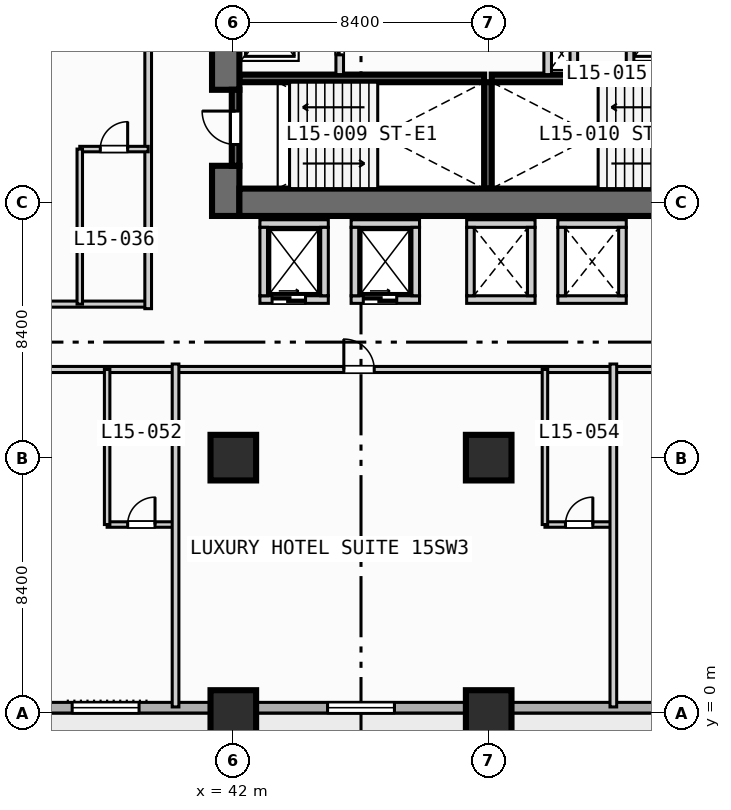
"""IFC4 building model, lengths in metres.
Left out: names, types, materials, properties, quantities, classifications, styles, units other than length and angle.
Written with IfcOpenShell. Run it as: python <this file> out.ifc"""

import sys

from ifc_helpers import new_model, si_unit, direction, frame, frame_2d, origin, origin_2d, place, context, subcontext, project, spatial, rectangle, extrude, element, fill, save


model = new_model("IFC4")
c1 = context("Model", 3, precision=1e-05, world=origin(), true_north=direction((0.0, 1.0)))
c2 = subcontext(c1, "Body", "Model", "MODEL_VIEW")
j1 = project(units=[si_unit("LENGTHUNIT", "METRE"), si_unit("PLANEANGLEUNIT", "RADIAN")], contexts=[c1])
p1 = place(None, origin())
s1 = spatial("IfcSite", under=j1, at=p1, CompositionType="ELEMENT")
p2 = place(p1, origin())
s2 = spatial("IfcBuilding", under=s1, at=p2, CompositionType="ELEMENT")
p3 = place(p2, frame((0.0, 0.0, 66.2)))
s3 = spatial("IfcBuildingStorey", under=s2, at=p3, CompositionType="ELEMENT", Elevation=66.2)
for number, where, z_axis, x_axis in (
    (1, (42.2, 20.875, 0.0), (0.0, 0.0, 1.0), (1.0, 0.0, 0.0)),
    (2, (50.5, 20.875, 0.0), (0.0, 0.0, 1.0), (1.0, 0.0, 0.0)),
):
    element("IfcWall", number, at=place(p3, frame(where, z_axis=z_axis, x_axis=x_axis)), inside=s3, PredefinedType="SOLIDWALL", context=c2, shape_type="SweptSolid", body=[
        extrude(rectangle(XDim=8.05, YDim=0.25, at=frame_2d((4.025, 0.0))), origin(), (0.0, 0.0, 1.0), 3.55),
    ])
p4 = place(p3, frame((50.375, 17.25, 0.0), z_axis=(0.0, 0.0, 1.0), x_axis=(0.0, 1.0, 0.0)))
e3 = element("IfcWall", 3, at=p4, inside=s3, PredefinedType="SOLIDWALL", context=c2, shape_type="SweptSolid", body=[
    extrude(rectangle(XDim=3.5, YDim=0.25, at=frame_2d((1.75, 0.0))), origin(), (0.0, 0.0, 1.0), 3.55),
])
p5 = place(p3, frame((41.75, 16.35, 0.0), z_axis=(0.0, 0.0, 1.0), x_axis=(0.0, 1.0, 0.0)))
e4 = element("IfcWall", 4, at=p5, inside=s3, PredefinedType="SHEAR", context=c2, shape_type="SweptSolid", body=[
    extrude(rectangle(XDim=1.65, YDim=0.9, at=frame_2d((0.825, 0.0))), origin(), (0.0, 0.0, 1.0), 3.55),
])
p6 = place(p3, frame((41.75, 20.5, 0.0), z_axis=(0.0, 0.0, 1.0), x_axis=(0.0, 1.0, 0.0)))
e5 = element("IfcWall", 5, at=p6, inside=s3, PredefinedType="SHEAR", context=c2, shape_type="SweptSolid", body=[
    extrude(rectangle(XDim=5.15, YDim=0.9, at=frame_2d((2.575, 0.0))), origin(), (0.0, 0.0, 1.0), 3.55),
])
p7 = place(p3, frame((42.2, 16.8, 0.0), z_axis=(0.0, 0.0, 1.0), x_axis=(1.0, 0.0, 0.0)))
e6 = element("IfcWall", 6, at=p7, inside=s3, PredefinedType="SHEAR", context=c2, shape_type="SweptSolid", body=[
    extrude(rectangle(XDim=16.35, YDim=0.9, at=frame_2d((8.175, 0.0))), origin(), (0.0, 0.0, 1.0), 3.55),
])
for number, where, z_axis, x_axis in (
    (7, (42.0, 0.0, 0.0), (0.0, 0.0, 1.0), (1.0, 0.0, 0.0)),
    (8, (42.0, 8.4, 0.0), (0.0, 0.0, 1.0), (1.0, 0.0, 0.0)),
    (9, (50.4, 0.0, 0.0), (0.0, 0.0, 1.0), (1.0, 0.0, 0.0)),
    (10, (50.4, 8.4, 0.0), (0.0, 0.0, 1.0), (1.0, 0.0, 0.0)),
):
    element("IfcColumn", number, at=place(p3, frame(where, z_axis=z_axis, x_axis=x_axis)), inside=s3, PredefinedType="COLUMN", context=c2, shape_type="SweptSolid", body=[
        extrude(rectangle(XDim=1.5, YDim=1.5, at=origin_2d()), origin(), (0.0, 0.0, 1.0), 3.8),
    ])
p8 = place(p3, frame((89.225, 0.175, 0.0), z_axis=(0.0, 0.0, 1.0), x_axis=(-1.0, 0.0, 0.0)))
e11 = element("IfcWall", 11, at=p8, inside=s3, PredefinedType="STANDARD", context=c2, shape_type="SweptSolid", body=[
    extrude(rectangle(XDim=86.05, YDim=0.35, at=frame_2d((43.025, 0.0))), origin(), (0.0, 0.0, 1.0), 3.55),
])
p9 = place(p8, frame((67.525, 0.0, 0.0)))
e12 = element("IfcOpeningElement", 12, at=p9, cuts=e11, PredefinedType="OPENING", context=c2, shape_type="SweptSolid", body=[
    extrude(rectangle(XDim=1.4, YDim=2.2, at=frame_2d((0.7, 1.1))), frame((0.0, 0.185, 0.0), z_axis=(0.0, -1.0, 0.0), x_axis=(1.0, 0.0, 0.0)), (0.0, 0.0, 1.0), 0.37),
])
p10 = place(p8, frame((58.725, 0.0, 0.85)))
e13 = element("IfcOpeningElement", 13, at=p10, cuts=e11, PredefinedType="OPENING", context=c2, shape_type="SweptSolid", body=[
    extrude(rectangle(XDim=2.2, YDim=1.8, at=frame_2d((1.1, 0.9))), frame((0.0, 0.185, 0.0), z_axis=(0.0, -1.0, 0.0), x_axis=(1.0, 0.0, 0.0)), (0.0, 0.0, 1.0), 0.37),
])
p11 = place(p8, frame((50.325, 0.0, 0.85)))
e14 = element("IfcOpeningElement", 14, at=p11, cuts=e11, PredefinedType="OPENING", context=c2, shape_type="SweptSolid", body=[
    extrude(rectangle(XDim=2.2, YDim=1.8, at=frame_2d((1.1, 0.9))), frame((0.0, 0.185, 0.0), z_axis=(0.0, -1.0, 0.0), x_axis=(1.0, 0.0, 0.0)), (0.0, 0.0, 1.0), 0.37),
])
p12 = place(p8, frame((41.925, 0.0, 0.85)))
e15 = element("IfcOpeningElement", 15, at=p12, cuts=e11, PredefinedType="OPENING", context=c2, shape_type="SweptSolid", body=[
    extrude(rectangle(XDim=2.2, YDim=1.8, at=frame_2d((1.1, 0.9))), frame((0.0, 0.185, 0.0), z_axis=(0.0, -1.0, 0.0), x_axis=(1.0, 0.0, 0.0)), (0.0, 0.0, 1.0), 0.37),
])
p13 = place(p8, frame((27.675, 0.0, 0.85)))
e16 = element("IfcOpeningElement", 16, at=p13, cuts=e11, PredefinedType="OPENING", context=c2, shape_type="SweptSolid", body=[
    extrude(rectangle(XDim=1.8, YDim=1.8, at=frame_2d((0.9, 0.9))), frame((0.0, 0.185, 0.0), z_axis=(0.0, -1.0, 0.0), x_axis=(1.0, 0.0, 0.0)), (0.0, 0.0, 1.0), 0.37),
])
p14 = place(p3, frame((42.075, 18.0, 0.0), z_axis=(0.0, 0.0, 1.0), x_axis=(0.0, 1.0, 0.0)))
e17 = element("IfcWall", 17, at=p14, inside=s3, PredefinedType="SOLIDWALL", context=c2, shape_type="SweptSolid", body=[
    extrude(rectangle(XDim=2.5, YDim=0.25, at=frame_2d((1.25, 0.0))), origin(), (0.0, 0.0, 1.0), 3.55),
])
p15 = place(p14, frame((0.7, 0.0, 0.0)))
e18 = element("IfcOpeningElement", 18, at=p15, cuts=e17, PredefinedType="OPENING", context=c2, shape_type="SweptSolid", body=[
    extrude(rectangle(XDim=1.1, YDim=2.15, at=frame_2d((0.55, 1.075))), frame((0.0, 0.135, 0.0), z_axis=(0.0, -1.0, 0.0), x_axis=(1.0, 0.0, 0.0)), (0.0, 0.0, 1.0), 0.27),
])
p16 = place(p3, frame((45.5, 21.0, 0.0), z_axis=(0.0, 0.0, 1.0), x_axis=(0.0, 1.0, 0.0)))
e19 = element("IfcWall", 19, at=p16, inside=s3, PredefinedType="SOLIDWALL", context=c2, shape_type="SweptSolid", body=[
    extrude(rectangle(XDim=4.15, YDim=0.25, at=frame_2d((2.075, 0.0))), origin(), (0.0, 0.0, 1.0), 3.55),
])
p17 = place(p16, frame((0.65, 0.0, 0.0)))
e20 = element("IfcOpeningElement", 20, at=p17, cuts=e19, PredefinedType="OPENING", context=c2, shape_type="SweptSolid", body=[
    extrude(rectangle(XDim=1.1, YDim=2.15, at=frame_2d((0.55, 1.075))), frame((0.0, 0.135, 0.0), z_axis=(0.0, -1.0, 0.0), x_axis=(1.0, 0.0, 0.0)), (0.0, 0.0, 1.0), 0.27),
])
p18 = place(p3, frame((52.34, 21.0, 0.0), z_axis=(0.0, 0.0, 1.0), x_axis=(0.0, 1.0, 0.0)))
e21 = element("IfcWall", 21, at=p18, inside=s3, PredefinedType="SOLIDWALL", context=c2, shape_type="SweptSolid", body=[
    extrude(rectangle(XDim=3.75, YDim=0.25, at=frame_2d((1.875, 0.0))), origin(), (0.0, 0.0, 1.0), 3.55),
])
p19 = place(p3, frame((55.05, 21.0, 0.0), z_axis=(0.0, 0.0, 1.0), x_axis=(0.0, 1.0, 0.0)))
e22 = element("IfcWall", 22, at=p19, inside=s3, PredefinedType="SOLIDWALL", context=c2, shape_type="SweptSolid", body=[
    extrude(rectangle(XDim=4.15, YDim=0.25, at=frame_2d((2.075, 0.0))), origin(), (0.0, 0.0, 1.0), 3.55),
])
p20 = place(p19, frame((1.85, 0.0, 0.0)))
e23 = element("IfcOpeningElement", 23, at=p20, cuts=e22, PredefinedType="OPENING", context=c2, shape_type="SweptSolid", body=[
    extrude(rectangle(XDim=1.1, YDim=2.15, at=frame_2d((0.55, 1.075))), frame((0.0, 0.135, 0.0), z_axis=(0.0, -1.0, 0.0), x_axis=(1.0, 0.0, 0.0)), (0.0, 0.0, 1.0), 0.27),
])
p21 = place(p3, frame((53.2, 21.0, 0.0), z_axis=(0.0, 0.0, 1.0), x_axis=(0.0, 1.0, 0.0)))
e24 = element("IfcWall", 24, at=p21, inside=s3, PredefinedType="SOLIDWALL", context=c2, shape_type="SweptSolid", body=[
    extrude(rectangle(XDim=1.3, YDim=0.25, at=frame_2d((0.65, 0.0))), origin(), (0.0, 0.0, 1.0), 3.55),
])
p22 = place(p3, frame((42.875, 13.6, 0.0), z_axis=(0.0, 0.0, 1.0), x_axis=(1.0, 0.0, 0.0)))
e25 = element("IfcWall", 25, at=p22, inside=s3, PredefinedType="SOLIDWALL", context=c2, shape_type="SweptSolid", body=[
    extrude(rectangle(XDim=2.25, YDim=0.25, at=frame_2d((1.125, 0.0))), origin(), (0.0, 0.0, 1.0), 3.55),
])
p23 = place(p22, frame((0.4, 0.0, 0.0)))
e26 = element("IfcOpeningElement", 26, at=p23, cuts=e25, PredefinedType="OPENING", context=c2, shape_type="SweptSolid", body=[
    extrude(rectangle(XDim=1.1, YDim=2.15, at=frame_2d((0.55, 1.075))), frame((0.0, 0.135, 0.0), z_axis=(0.0, -1.0, 0.0), x_axis=(1.0, 0.0, 0.0)), (0.0, 0.0, 1.0), 0.27),
])
for number, where, z_axis, x_axis in (
    (27, (42.875, 16.1, 0.0), (0.0, 0.0, 1.0), (1.0, 0.0, 0.0)),
    (28, (43.0, 13.725, 0.0), (0.0, 0.0, 1.0), (0.0, 1.0, 0.0)),
    (29, (45.0, 13.725, 0.0), (0.0, 0.0, 1.0), (0.0, 1.0, 0.0)),
):
    element("IfcWall", number, at=place(p3, frame(where, z_axis=z_axis, x_axis=x_axis)), inside=s3, PredefinedType="SOLIDWALL", context=c2, shape_type="SweptSolid", body=[
        extrude(rectangle(XDim=2.25, YDim=0.25, at=frame_2d((1.125, 0.0))), origin(), (0.0, 0.0, 1.0), 3.55),
    ])
p24 = place(p3, frame((45.875, 13.6, 0.0), z_axis=(0.0, 0.0, 1.0), x_axis=(1.0, 0.0, 0.0)))
e30 = element("IfcWall", 30, at=p24, inside=s3, PredefinedType="SOLIDWALL", context=c2, shape_type="SweptSolid", body=[
    extrude(rectangle(XDim=2.25, YDim=0.25, at=frame_2d((1.125, 0.0))), origin(), (0.0, 0.0, 1.0), 3.55),
])
p25 = place(p24, frame((0.4, 0.0, 0.0)))
e31 = element("IfcOpeningElement", 31, at=p25, cuts=e30, PredefinedType="OPENING", context=c2, shape_type="SweptSolid", body=[
    extrude(rectangle(XDim=1.1, YDim=2.15, at=frame_2d((0.55, 1.075))), frame((0.0, 0.135, 0.0), z_axis=(0.0, -1.0, 0.0), x_axis=(1.0, 0.0, 0.0)), (0.0, 0.0, 1.0), 0.27),
])
for number, where, z_axis, x_axis in (
    (32, (45.875, 16.1, 0.0), (0.0, 0.0, 1.0), (1.0, 0.0, 0.0)),
    (33, (46.0, 13.725, 0.0), (0.0, 0.0, 1.0), (0.0, 1.0, 0.0)),
    (34, (48.0, 13.725, 0.0), (0.0, 0.0, 1.0), (0.0, 1.0, 0.0)),
    (35, (49.675, 13.6, 0.0), (0.0, 0.0, 1.0), (1.0, 0.0, 0.0)),
    (36, (49.675, 16.1, 0.0), (0.0, 0.0, 1.0), (1.0, 0.0, 0.0)),
    (37, (49.8, 13.725, 0.0), (0.0, 0.0, 1.0), (0.0, 1.0, 0.0)),
    (38, (51.8, 13.725, 0.0), (0.0, 0.0, 1.0), (0.0, 1.0, 0.0)),
    (39, (52.675, 13.6, 0.0), (0.0, 0.0, 1.0), (1.0, 0.0, 0.0)),
    (40, (52.675, 16.1, 0.0), (0.0, 0.0, 1.0), (1.0, 0.0, 0.0)),
    (41, (52.8, 13.725, 0.0), (0.0, 0.0, 1.0), (0.0, 1.0, 0.0)),
    (42, (54.8, 13.725, 0.0), (0.0, 0.0, 1.0), (0.0, 1.0, 0.0)),
):
    element("IfcWall", number, at=place(p3, frame(where, z_axis=z_axis, x_axis=x_axis)), inside=s3, PredefinedType="SOLIDWALL", context=c2, shape_type="SweptSolid", body=[
        extrude(rectangle(XDim=2.25, YDim=0.25, at=frame_2d((1.125, 0.0))), origin(), (0.0, 0.0, 1.0), 3.55),
    ])
p26 = place(p3, frame((25.6, 13.45, 0.0), z_axis=(0.0, 0.0, 1.0), x_axis=(1.0, 0.0, 0.0)))
e43 = element("IfcWall", 43, at=p26, inside=s3, PredefinedType="PARTITIONING", context=c2, shape_type="SweptSolid", body=[
    extrude(rectangle(XDim=13.6, YDim=0.2, at=frame_2d((6.8, 0.0))), origin(), (0.0, 0.0, 1.0), 3.55),
])
p27 = place(p26, frame((1.735, 0.0, 0.0)))
e44 = element("IfcOpeningElement", 44, at=p27, cuts=e43, PredefinedType="OPENING", context=c2, shape_type="SweptSolid", body=[
    extrude(rectangle(XDim=1.0, YDim=2.15, at=frame_2d((0.5, 1.075))), frame((0.0, 0.11, 0.0), z_axis=(0.0, -1.0, 0.0), x_axis=(1.0, 0.0, 0.0)), (0.0, 0.0, 1.0), 0.22),
])
p28 = place(p26, frame((8.535, 0.0, 0.0)))
e45 = element("IfcOpeningElement", 45, at=p28, cuts=e43, PredefinedType="OPENING", context=c2, shape_type="SweptSolid", body=[
    extrude(rectangle(XDim=1.0, YDim=2.15, at=frame_2d((0.5, 1.075))), frame((0.0, 0.11, 0.0), z_axis=(0.0, -1.0, 0.0), x_axis=(1.0, 0.0, 0.0)), (0.0, 0.0, 1.0), 0.22),
])
p29 = place(p3, frame((39.2, 13.3, 0.0), z_axis=(0.0, 0.0, 1.0), x_axis=(0.0, 1.0, 0.0)))
e46 = element("IfcWall", 46, at=p29, inside=s3, PredefinedType="PARTITIONING", context=c2, shape_type="SweptSolid", body=[
    extrude(rectangle(XDim=20.13, YDim=0.22, at=frame_2d((10.065, 0.0))), origin(), (0.0, 0.0, 1.0), 3.55),
])
p30 = place(p3, frame((36.95, 18.55, 0.0), z_axis=(0.0, 0.0, 1.0), x_axis=(1.0, 0.0, 0.0)))
e47 = element("IfcWall", 47, at=p30, inside=s3, PredefinedType="PLUMBINGWALL", context=c2, shape_type="SweptSolid", body=[
    extrude(rectangle(XDim=2.25, YDim=0.18, at=frame_2d((1.125, 0.0))), origin(), (0.0, 0.0, 1.0), 3.55),
])
p31 = place(p30, frame((0.675, 0.0, 0.0)))
e48 = element("IfcOpeningElement", 48, at=p31, cuts=e47, PredefinedType="OPENING", context=c2, shape_type="SweptSolid", body=[
    extrude(rectangle(XDim=0.9, YDim=2.1, at=frame_2d((0.45, 1.05))), frame((0.0, 0.1, 0.0), z_axis=(0.0, -1.0, 0.0), x_axis=(1.0, 0.0, 0.0)), (0.0, 0.0, 1.0), 0.2),
])
p32 = place(p3, frame((36.95, 13.45, 0.0), z_axis=(0.0, 0.0, 1.0), x_axis=(0.0, 1.0, 0.0)))
e49 = element("IfcWall", 49, at=p32, inside=s3, PredefinedType="PLUMBINGWALL", context=c2, shape_type="SweptSolid", body=[
    extrude(rectangle(XDim=5.1, YDim=0.18, at=frame_2d((2.55, 0.0))), origin(), (0.0, 0.0, 1.0), 3.55),
])
p33 = place(p3, frame((13.7, 11.3, 0.0), z_axis=(0.0, 0.0, 1.0), x_axis=(1.0, 0.0, 0.0)))
e50 = element("IfcWall", 50, at=p33, inside=s3, PredefinedType="PARTITIONING", context=c2, shape_type="SweptSolid", body=[
    extrude(rectangle(XDim=50.1, YDim=0.2, at=frame_2d((25.05, 0.0))), origin(), (0.0, 0.0, 1.0), 3.55),
])
p34 = place(p33, frame((3.61, 0.0, 0.0)))
e51 = element("IfcOpeningElement", 51, at=p34, cuts=e50, PredefinedType="OPENING", context=c2, shape_type="SweptSolid", body=[
    extrude(rectangle(XDim=1.0, YDim=2.15, at=frame_2d((0.5, 1.075))), frame((0.0, 0.11, 0.0), z_axis=(0.0, -1.0, 0.0), x_axis=(1.0, 0.0, 0.0)), (0.0, 0.0, 1.0), 0.22),
])
p35 = place(p33, frame((16.81, 0.0, 0.0)))
e52 = element("IfcOpeningElement", 52, at=p35, cuts=e50, PredefinedType="OPENING", context=c2, shape_type="SweptSolid", body=[
    extrude(rectangle(XDim=1.0, YDim=2.15, at=frame_2d((0.5, 1.075))), frame((0.0, 0.11, 0.0), z_axis=(0.0, -1.0, 0.0), x_axis=(1.0, 0.0, 0.0)), (0.0, 0.0, 1.0), 0.22),
])
p36 = place(p33, frame((31.935, 0.0, 0.0)))
e53 = element("IfcOpeningElement", 53, at=p36, cuts=e50, PredefinedType="OPENING", context=c2, shape_type="SweptSolid", body=[
    extrude(rectangle(XDim=1.0, YDim=2.15, at=frame_2d((0.5, 1.075))), frame((0.0, 0.11, 0.0), z_axis=(0.0, -1.0, 0.0), x_axis=(1.0, 0.0, 0.0)), (0.0, 0.0, 1.0), 0.22),
])
p37 = place(p33, frame((43.785, 0.0, 0.0)))
e54 = element("IfcOpeningElement", 54, at=p37, cuts=e50, PredefinedType="OPENING", context=c2, shape_type="SweptSolid", body=[
    extrude(rectangle(XDim=1.0, YDim=2.15, at=frame_2d((0.5, 1.075))), frame((0.0, 0.11, 0.0), z_axis=(0.0, -1.0, 0.0), x_axis=(1.0, 0.0, 0.0)), (0.0, 0.0, 1.0), 0.22),
])
p38 = place(p3, frame((37.85, 6.2, 0.0), z_axis=(0.0, 0.0, 1.0), x_axis=(1.0, 0.0, 0.0)))
e55 = element("IfcWall", 55, at=p38, inside=s3, PredefinedType="PLUMBINGWALL", context=c2, shape_type="SweptSolid", body=[
    extrude(rectangle(XDim=2.25, YDim=0.18, at=frame_2d((1.125, 0.0))), origin(), (0.0, 0.0, 1.0), 3.55),
])
p39 = place(p38, frame((0.675, 0.0, 0.0)))
e56 = element("IfcOpeningElement", 56, at=p39, cuts=e55, PredefinedType="OPENING", context=c2, shape_type="SweptSolid", body=[
    extrude(rectangle(XDim=0.9, YDim=2.1, at=frame_2d((0.45, 1.05))), frame((0.0, 0.1, 0.0), z_axis=(0.0, -1.0, 0.0), x_axis=(1.0, 0.0, 0.0)), (0.0, 0.0, 1.0), 0.2),
])
p40 = place(p3, frame((37.85, 6.2, 0.0), z_axis=(0.0, 0.0, 1.0), x_axis=(0.0, 1.0, 0.0)))
e57 = element("IfcWall", 57, at=p40, inside=s3, PredefinedType="PLUMBINGWALL", context=c2, shape_type="SweptSolid", body=[
    extrude(rectangle(XDim=5.1, YDim=0.18, at=frame_2d((2.55, 0.0))), origin(), (0.0, 0.0, 1.0), 3.55),
])
p41 = place(p3, frame((40.1, 0.2, 0.0), z_axis=(0.0, 0.0, 1.0), x_axis=(0.0, 1.0, 0.0)))
e58 = element("IfcWall", 58, at=p41, inside=s3, PredefinedType="PARTITIONING", context=c2, shape_type="SweptSolid", body=[
    extrude(rectangle(XDim=11.28, YDim=0.22, at=frame_2d((5.64, 0.0))), origin(), (0.0, 0.0, 1.0), 3.55),
])
p42 = place(p3, frame((52.25, 6.2, 0.0), z_axis=(0.0, 0.0, 1.0), x_axis=(1.0, 0.0, 0.0)))
e59 = element("IfcWall", 59, at=p42, inside=s3, PredefinedType="PLUMBINGWALL", context=c2, shape_type="SweptSolid", body=[
    extrude(rectangle(XDim=2.25, YDim=0.18, at=frame_2d((1.125, 0.0))), origin(), (0.0, 0.0, 1.0), 3.55),
])
p43 = place(p42, frame((0.675, 0.0, 0.0)))
e60 = element("IfcOpeningElement", 60, at=p43, cuts=e59, PredefinedType="OPENING", context=c2, shape_type="SweptSolid", body=[
    extrude(rectangle(XDim=0.9, YDim=2.1, at=frame_2d((0.45, 1.05))), frame((0.0, 0.1, 0.0), z_axis=(0.0, -1.0, 0.0), x_axis=(1.0, 0.0, 0.0)), (0.0, 0.0, 1.0), 0.2),
])
p44 = place(p3, frame((52.25, 6.2, 0.0), z_axis=(0.0, 0.0, 1.0), x_axis=(0.0, 1.0, 0.0)))
e61 = element("IfcWall", 61, at=p44, inside=s3, PredefinedType="PLUMBINGWALL", context=c2, shape_type="SweptSolid", body=[
    extrude(rectangle(XDim=5.1, YDim=0.18, at=frame_2d((2.55, 0.0))), origin(), (0.0, 0.0, 1.0), 3.55),
])
p45 = place(p3, frame((54.5, 0.2, 0.0), z_axis=(0.0, 0.0, 1.0), x_axis=(0.0, 1.0, 0.0)))
e62 = element("IfcWall", 62, at=p45, inside=s3, PredefinedType="PARTITIONING", context=c2, shape_type="SweptSolid", body=[
    extrude(rectangle(XDim=11.28, YDim=0.22, at=frame_2d((5.64, 0.0))), origin(), (0.0, 0.0, 1.0), 3.55),
])
p46 = place(p11, origin())
e63 = element("IfcWindow", 63, at=p46, inside=s3, PartitioningType="SINGLE_PANEL", PredefinedType="WINDOW", context=c2, shape_type="SweptSolid", body=[
    extrude(rectangle(XDim=2.2, YDim=1.8, at=frame_2d((1.1, 0.9))), frame((0.0, 0.03, 0.0), z_axis=(0.0, -1.0, 0.0), x_axis=(1.0, 0.0, 0.0)), (0.0, 0.0, 1.0), 0.06),
])
fill(e14, e63)
p47 = place(p12, origin())
e64 = element("IfcWindow", 64, at=p47, inside=s3, PartitioningType="SINGLE_PANEL", PredefinedType="WINDOW", context=c2, shape_type="SweptSolid", body=[
    extrude(rectangle(XDim=2.2, YDim=1.8, at=frame_2d((1.1, 0.9))), frame((0.0, 0.03, 0.0), z_axis=(0.0, -1.0, 0.0), x_axis=(1.0, 0.0, 0.0)), (0.0, 0.0, 1.0), 0.06),
])
fill(e15, e64)
p48 = place(p15, origin())
e65 = element("IfcDoor", 65, at=p48, inside=s3, OperationType="SINGLE_SWING_RIGHT", PredefinedType="DOOR", context=c2, shape_type="SweptSolid", body=[
    extrude(rectangle(XDim=1.1, YDim=2.15, at=frame_2d((0.55, 1.075))), frame((0.0, 0.025, 0.0), z_axis=(0.0, -1.0, 0.0), x_axis=(1.0, 0.0, 0.0)), (0.0, 0.0, 1.0), 0.05),
])
fill(e18, e65)
p49 = place(p17, origin())
e66 = element("IfcDoor", 66, at=p49, inside=s3, OperationType="SLIDING_TO_LEFT", PredefinedType="DOOR", context=c2, shape_type="SweptSolid", body=[
    extrude(rectangle(XDim=1.1, YDim=2.15, at=frame_2d((0.55, 1.075))), frame((0.0, 0.025, 0.0), z_axis=(0.0, -1.0, 0.0), x_axis=(1.0, 0.0, 0.0)), (0.0, 0.0, 1.0), 0.05),
])
fill(e20, e66)
p50 = place(p23, origin())
e67 = element("IfcDoor", 67, at=p50, inside=s3, OperationType="SLIDING_TO_LEFT", PredefinedType="DOOR", context=c2, shape_type="SweptSolid", body=[
    extrude(rectangle(XDim=1.1, YDim=2.15, at=frame_2d((0.55, 1.075))), frame((0.0, 0.025, 0.0), z_axis=(0.0, -1.0, 0.0), x_axis=(1.0, 0.0, 0.0)), (0.0, 0.0, 1.0), 0.05),
])
fill(e26, e67)
p51 = place(p25, origin())
e68 = element("IfcDoor", 68, at=p51, inside=s3, OperationType="SLIDING_TO_LEFT", PredefinedType="DOOR", context=c2, shape_type="SweptSolid", body=[
    extrude(rectangle(XDim=1.1, YDim=2.15, at=frame_2d((0.55, 1.075))), frame((0.0, 0.025, 0.0), z_axis=(0.0, -1.0, 0.0), x_axis=(1.0, 0.0, 0.0)), (0.0, 0.0, 1.0), 0.05),
])
fill(e31, e68)
p52 = place(p31, origin())
e69 = element("IfcDoor", 69, at=p52, inside=s3, OperationType="SINGLE_SWING_RIGHT", PredefinedType="DOOR", context=c2, shape_type="SweptSolid", body=[
    extrude(rectangle(XDim=0.9, YDim=2.1, at=frame_2d((0.45, 1.05))), frame((0.0, 0.025, 0.0), z_axis=(0.0, -1.0, 0.0), x_axis=(1.0, 0.0, 0.0)), (0.0, 0.0, 1.0), 0.05),
])
fill(e48, e69)
p53 = place(p36, origin())
e70 = element("IfcDoor", 70, at=p53, inside=s3, OperationType="SINGLE_SWING_LEFT", PredefinedType="DOOR", context=c2, shape_type="SweptSolid", body=[
    extrude(rectangle(XDim=1.0, YDim=2.15, at=frame_2d((0.5, 1.075))), frame((0.0, 0.025, 0.0), z_axis=(0.0, -1.0, 0.0), x_axis=(1.0, 0.0, 0.0)), (0.0, 0.0, 1.0), 0.05),
])
fill(e53, e70)
p54 = place(p39, origin())
e71 = element("IfcDoor", 71, at=p54, inside=s3, OperationType="SINGLE_SWING_RIGHT", PredefinedType="DOOR", context=c2, shape_type="SweptSolid", body=[
    extrude(rectangle(XDim=0.9, YDim=2.1, at=frame_2d((0.45, 1.05))), frame((0.0, 0.025, 0.0), z_axis=(0.0, -1.0, 0.0), x_axis=(1.0, 0.0, 0.0)), (0.0, 0.0, 1.0), 0.05),
])
fill(e56, e71)
p55 = place(p43, origin())
e72 = element("IfcDoor", 72, at=p55, inside=s3, OperationType="SINGLE_SWING_RIGHT", PredefinedType="DOOR", context=c2, shape_type="SweptSolid", body=[
    extrude(rectangle(XDim=0.9, YDim=2.1, at=frame_2d((0.45, 1.05))), frame((0.0, 0.025, 0.0), z_axis=(0.0, -1.0, 0.0), x_axis=(1.0, 0.0, 0.0)), (0.0, 0.0, 1.0), 0.05),
])
fill(e60, e72)
save(model, sys.argv[1])
